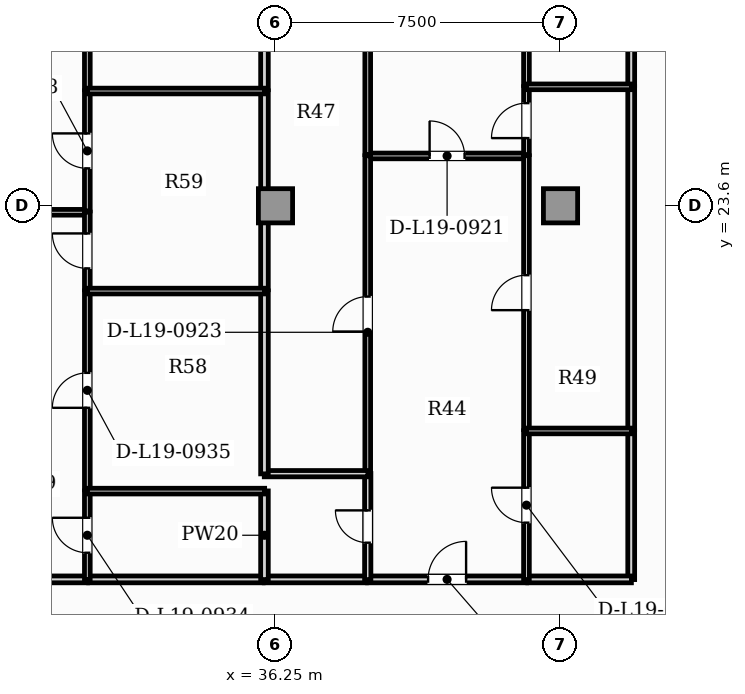
"""IFC4 building model, lengths in metres.
Left out: names, types, materials, properties, quantities, classifications, styles, units other than length and angle.
Written with IfcOpenShell. Run it as: python <this file> out.ifc"""

import sys

from ifc_helpers import new_model, si_unit, direction, frame, frame_2d, origin, origin_2d, place, context, subcontext, project, spatial, rectangle, extrude, element, fill, save


model = new_model("IFC4")
c1 = context("Model", 3, precision=1e-05, world=origin(), true_north=direction((0.0, 1.0)))
c2 = subcontext(c1, "Body", "Model", "MODEL_VIEW")
j1 = project(units=[si_unit("LENGTHUNIT", "METRE"), si_unit("PLANEANGLEUNIT", "RADIAN")], contexts=[c1])
p1 = place(None, origin())
s1 = spatial("IfcSite", under=j1, at=p1, CompositionType="ELEMENT")
p2 = place(p1, origin())
s2 = spatial("IfcBuilding", under=s1, at=p2, CompositionType="ELEMENT")
p3 = place(p2, frame((0.0, 0.0, 81.05)))
s3 = spatial("IfcBuildingStorey", under=s2, at=p3, CompositionType="ELEMENT", Elevation=81.05)
for number, where, z_axis, x_axis in (
    (1, (36.25, 23.6, 0.0), (0.0, 0.0, 1.0), (1.0, 0.0, 0.0)),
    (2, (43.75, 23.6, 0.0), (0.0, 0.0, 1.0), (1.0, 0.0, 0.0)),
):
    element("IfcColumn", number, at=place(p3, frame(where, z_axis=z_axis, x_axis=x_axis)), inside=s3, PredefinedType="COLUMN", context=c2, shape_type="SweptSolid", body=[
        extrude(rectangle(XDim=0.9, YDim=0.9, at=origin_2d()), origin(), (0.0, 0.0, 1.0), 3.85),
    ])
p4 = place(p3, frame((38.672, 13.77, 0.0), z_axis=(0.0, 0.0, 1.0), x_axis=(1.0, 0.0, 0.0)))
e3 = element("IfcWall", 3, at=p4, inside=s3, PredefinedType="PARTITIONING", context=c2, shape_type="SweptSolid", body=[
    extrude(rectangle(XDim=4.186, YDim=0.18, at=frame_2d((2.093, 0.0))), origin(), (0.0, 0.0, 1.0), 3.6),
])
p5 = place(p4, frame((1.593, 0.0, 0.0)))
e4 = element("IfcOpeningElement", 4, at=p5, cuts=e3, PredefinedType="OPENING", context=c2, shape_type="SweptSolid", body=[
    extrude(rectangle(XDim=1.0, YDim=2.15, at=frame_2d((0.5, 1.075))), frame((0.0, 0.1, 0.0), z_axis=(0.0, -1.0, 0.0), x_axis=(1.0, 0.0, 0.0)), (0.0, 0.0, 1.0), 0.2),
])
p6 = place(p3, frame((35.955, 13.77, 0.0), z_axis=(0.0, 0.0, 1.0), x_axis=(1.0, 0.0, 0.0)))
e5 = element("IfcWall", 5, at=p6, inside=s3, PredefinedType="PARTITIONING", context=c2, shape_type="SweptSolid", body=[
    extrude(rectangle(XDim=2.687, YDim=0.18, at=frame_2d((1.344, 0.0))), origin(), (0.0, 0.0, 1.0), 3.6),
])
p7 = place(p3, frame((45.61, 13.765, 0.0), z_axis=(0.0, 0.0, 1.0), x_axis=(0.0, 1.0, 0.0)))
e6 = element("IfcWall", 6, at=p7, inside=s3, PredefinedType="PARTITIONING", context=c2, shape_type="SweptSolid", body=[
    extrude(rectangle(XDim=3.916, YDim=0.18, at=frame_2d((1.958, 0.0))), origin(), (0.0, 0.0, 1.0), 3.6),
])
p8 = place(p3, frame((42.888, 13.77, 0.0), z_axis=(0.0, 0.0, 1.0), x_axis=(1.0, 0.0, 0.0)))
e7 = element("IfcWall", 7, at=p8, inside=s3, PredefinedType="PARTITIONING", context=c2, shape_type="SweptSolid", body=[
    extrude(rectangle(XDim=2.727, YDim=0.18, at=frame_2d((1.363, 0.0))), origin(), (0.0, 0.0, 1.0), 3.6),
])
p9 = place(p3, frame((45.61, 17.711, 0.0), z_axis=(0.0, 0.0, 1.0), x_axis=(0.0, 1.0, 0.0)))
e8 = element("IfcWall", 8, at=p9, inside=s3, PredefinedType="PARTITIONING", context=c2, shape_type="SweptSolid", body=[
    extrude(rectangle(XDim=9.024, YDim=0.18, at=frame_2d((4.512, 0.0))), origin(), (0.0, 0.0, 1.0), 3.6),
])
p10 = place(p3, frame((45.61, 26.765, 0.0), z_axis=(0.0, 0.0, 1.0), x_axis=(0.0, 1.0, 0.0)))
e9 = element("IfcWall", 9, at=p10, inside=s3, PredefinedType="PARTITIONING", context=c2, shape_type="SweptSolid", body=[
    extrude(rectangle(XDim=1.13, YDim=0.18, at=frame_2d((0.565, 0.0))), origin(), (0.0, 0.0, 1.0), 3.6),
])
p11 = place(p3, frame((26.314, 13.77, 0.0), z_axis=(0.0, 0.0, 1.0), x_axis=(1.0, 0.0, 0.0)))
e10 = element("IfcWall", 10, at=p11, inside=s3, PredefinedType="PARTITIONING", context=c2, shape_type="SweptSolid", body=[
    extrude(rectangle(XDim=4.99, YDim=0.18, at=frame_2d((2.495, 0.0))), origin(), (0.0, 0.0, 1.0), 3.6),
])
p12 = place(p11, frame((1.995, 0.0, 0.0)))
e11 = element("IfcOpeningElement", 11, at=p12, cuts=e10, PredefinedType="OPENING", context=c2, shape_type="SweptSolid", body=[
    extrude(rectangle(XDim=1.0, YDim=2.15, at=frame_2d((0.5, 1.075))), frame((0.0, 0.1, 0.0), z_axis=(0.0, -1.0, 0.0), x_axis=(1.0, 0.0, 0.0)), (0.0, 0.0, 1.0), 0.2),
])
p13 = place(p3, frame((31.334, 13.77, 0.0), z_axis=(0.0, 0.0, 1.0), x_axis=(1.0, 0.0, 0.0)))
e12 = element("IfcWall", 12, at=p13, inside=s3, PredefinedType="PARTITIONING", context=c2, shape_type="SweptSolid", body=[
    extrude(rectangle(XDim=4.591, YDim=0.18, at=frame_2d((2.295, 0.0))), origin(), (0.0, 0.0, 1.0), 3.6),
])
p14 = place(p3, frame((38.672, 24.912, 0.0), z_axis=(0.0, 0.0, 1.0), x_axis=(1.0, 0.0, 0.0)))
e13 = element("IfcWall", 13, at=p14, inside=s3, PredefinedType="PARTITIONING", context=c2, shape_type="SweptSolid", body=[
    extrude(rectangle(XDim=4.186, YDim=0.15, at=frame_2d((2.093, 0.0))), origin(), (0.0, 0.0, 1.0), 3.6),
])
p15 = place(p14, frame((1.633, 0.0, 0.0)))
e14 = element("IfcOpeningElement", 14, at=p15, cuts=e13, PredefinedType="OPENING", context=c2, shape_type="SweptSolid", body=[
    extrude(rectangle(XDim=0.92, YDim=2.1, at=frame_2d((0.46, 1.05))), frame((0.0, 0.085, 0.0), z_axis=(0.0, -1.0, 0.0), x_axis=(1.0, 0.0, 0.0)), (0.0, 0.0, 1.0), 0.17),
])
p16 = place(p3, frame((38.677, 13.765, 0.0), z_axis=(0.0, 0.0, 1.0), x_axis=(0.0, 1.0, 0.0)))
e15 = element("IfcWall", 15, at=p16, inside=s3, PredefinedType="PLUMBINGWALL", context=c2, shape_type="SweptSolid", body=[
    extrude(rectangle(XDim=2.792, YDim=0.165, at=frame_2d((1.396, 0.0))), origin(), (0.0, 0.0, 1.0), 3.6),
])
p17 = place(p16, frame((0.971, 0.0, 0.0)))
e16 = element("IfcOpeningElement", 16, at=p17, cuts=e15, PredefinedType="OPENING", context=c2, shape_type="SweptSolid", body=[
    extrude(rectangle(XDim=0.85, YDim=2.1, at=frame_2d((0.425, 1.05))), frame((0.0, 0.093, 0.0), z_axis=(0.0, -1.0, 0.0), x_axis=(1.0, 0.0, 0.0)), (0.0, 0.0, 1.0), 0.185),
])
p18 = place(p3, frame((38.677, 16.586, 0.0), z_axis=(0.0, 0.0, 1.0), x_axis=(0.0, 1.0, 0.0)))
e17 = element("IfcWall", 17, at=p18, inside=s3, PredefinedType="PARTITIONING", context=c2, shape_type="SweptSolid", body=[
    extrude(rectangle(XDim=8.331, YDim=0.15, at=frame_2d((4.166, 0.0))), origin(), (0.0, 0.0, 1.0), 3.6),
])
p19 = place(p18, frame((3.705, 0.0, 0.0)))
e18 = element("IfcOpeningElement", 18, at=p19, cuts=e17, PredefinedType="OPENING", context=c2, shape_type="SweptSolid", body=[
    extrude(rectangle(XDim=0.92, YDim=2.1, at=frame_2d((0.46, 1.05))), frame((0.0, 0.085, 0.0), z_axis=(0.0, -1.0, 0.0), x_axis=(1.0, 0.0, 0.0)), (0.0, 0.0, 1.0), 0.17),
])
p20 = place(p3, frame((42.854, 13.765, 0.0), z_axis=(0.0, 0.0, 1.0), x_axis=(0.0, 1.0, 0.0)))
e19 = element("IfcWall", 19, at=p20, inside=s3, PredefinedType="PARTITIONING", context=c2, shape_type="SweptSolid", body=[
    extrude(rectangle(XDim=3.916, YDim=0.15, at=frame_2d((1.958, 0.0))), origin(), (0.0, 0.0, 1.0), 3.6),
])
p21 = place(p20, frame((1.498, 0.0, 0.0)))
e20 = element("IfcOpeningElement", 20, at=p21, cuts=e19, PredefinedType="OPENING", context=c2, shape_type="SweptSolid", body=[
    extrude(rectangle(XDim=0.92, YDim=2.1, at=frame_2d((0.46, 1.05))), frame((0.0, 0.085, 0.0), z_axis=(0.0, -1.0, 0.0), x_axis=(1.0, 0.0, 0.0)), (0.0, 0.0, 1.0), 0.17),
])
p22 = place(p3, frame((42.854, 17.711, 0.0), z_axis=(0.0, 0.0, 1.0), x_axis=(0.0, 1.0, 0.0)))
e21 = element("IfcWall", 21, at=p22, inside=s3, PredefinedType="PARTITIONING", context=c2, shape_type="SweptSolid", body=[
    extrude(rectangle(XDim=7.206, YDim=0.15, at=frame_2d((3.603, 0.0))), origin(), (0.0, 0.0, 1.0), 3.6),
])
p23 = place(p22, frame((3.143, 0.0, 0.0)))
e22 = element("IfcOpeningElement", 22, at=p23, cuts=e21, PredefinedType="OPENING", context=c2, shape_type="SweptSolid", body=[
    extrude(rectangle(XDim=0.92, YDim=2.1, at=frame_2d((0.46, 1.05))), frame((0.0, 0.085, 0.0), z_axis=(0.0, -1.0, 0.0), x_axis=(1.0, 0.0, 0.0)), (0.0, 0.0, 1.0), 0.17),
])
p24 = place(p3, frame((38.677, 24.947, 0.0), z_axis=(0.0, 0.0, 1.0), x_axis=(0.0, 1.0, 0.0)))
e23 = element("IfcWall", 23, at=p24, inside=s3, PredefinedType="PARTITIONING", context=c2, shape_type="SweptSolid", body=[
    extrude(rectangle(XDim=13.678, YDim=0.15, at=frame_2d((6.839, 0.0))), origin(), (0.0, 0.0, 1.0), 3.6),
])
p25 = place(p24, frame((6.379, 0.0, 0.0)))
e24 = element("IfcOpeningElement", 24, at=p25, cuts=e23, PredefinedType="OPENING", context=c2, shape_type="SweptSolid", body=[
    extrude(rectangle(XDim=0.92, YDim=2.1, at=frame_2d((0.46, 1.05))), frame((0.0, 0.085, 0.0), z_axis=(0.0, -1.0, 0.0), x_axis=(1.0, 0.0, 0.0)), (0.0, 0.0, 1.0), 0.17),
])
p26 = place(p3, frame((42.854, 24.947, 0.0), z_axis=(0.0, 0.0, 1.0), x_axis=(0.0, 1.0, 0.0)))
e25 = element("IfcWall", 25, at=p26, inside=s3, PredefinedType="PARTITIONING", context=c2, shape_type="SweptSolid", body=[
    extrude(rectangle(XDim=1.788, YDim=0.15, at=frame_2d((0.894, 0.0))), origin(), (0.0, 0.0, 1.0), 3.6),
])
p27 = place(p26, frame((0.434, 0.0, 0.0)))
e26 = element("IfcOpeningElement", 26, at=p27, cuts=e25, PredefinedType="OPENING", context=c2, shape_type="SweptSolid", body=[
    extrude(rectangle(XDim=0.92, YDim=2.1, at=frame_2d((0.46, 1.05))), frame((0.0, 0.085, 0.0), z_axis=(0.0, -1.0, 0.0), x_axis=(1.0, 0.0, 0.0)), (0.0, 0.0, 1.0), 0.17),
])
p28 = place(p3, frame((42.854, 26.765, 0.0), z_axis=(0.0, 0.0, 1.0), x_axis=(0.0, 1.0, 0.0)))
e27 = element("IfcWall", 27, at=p28, inside=s3, PredefinedType="PARTITIONING", context=c2, shape_type="SweptSolid", body=[
    extrude(rectangle(XDim=11.86, YDim=0.15, at=frame_2d((5.93, 0.0))), origin(), (0.0, 0.0, 1.0), 3.6),
])
p29 = place(p28, frame((5.47, 0.0, 0.0)))
e28 = element("IfcOpeningElement", 28, at=p29, cuts=e27, PredefinedType="OPENING", context=c2, shape_type="SweptSolid", body=[
    extrude(rectangle(XDim=0.92, YDim=2.1, at=frame_2d((0.46, 1.05))), frame((0.0, 0.085, 0.0), z_axis=(0.0, -1.0, 0.0), x_axis=(1.0, 0.0, 0.0)), (0.0, 0.0, 1.0), 0.17),
])
p30 = place(p3, frame((35.955, 16.551, 0.0), z_axis=(0.0, 0.0, 1.0), x_axis=(1.0, 0.0, 0.0)))
e29 = element("IfcWall", 29, at=p30, inside=s3, PredefinedType="PLUMBINGWALL", context=c2, shape_type="SweptSolid", body=[
    extrude(rectangle(XDim=2.727, YDim=0.165, at=frame_2d((1.364, 0.0))), origin(), (0.0, 0.0, 1.0), 3.6),
])
p31 = place(p3, frame((35.96, 13.765, 0.0), z_axis=(0.0, 0.0, 1.0), x_axis=(0.0, 1.0, 0.0)))
e30 = element("IfcWall", 30, at=p31, inside=s3, PredefinedType="PARTITIONING", context=c2, shape_type="SweptSolid", body=[
    extrude(rectangle(XDim=2.333, YDim=0.2, at=frame_2d((1.166, 0.0))), origin(), (0.0, 0.0, 1.0), 3.6),
])
p32 = place(p3, frame((35.96, 16.546, 0.0), z_axis=(0.0, 0.0, 1.0), x_axis=(0.0, 1.0, 0.0)))
e31 = element("IfcWall", 31, at=p32, inside=s3, PredefinedType="PARTITIONING", context=c2, shape_type="SweptSolid", body=[
    extrude(rectangle(XDim=4.815, YDim=0.2, at=frame_2d((2.407, 0.0))), origin(), (0.0, 0.0, 1.0), 3.6),
])
p33 = place(p3, frame((35.96, 21.391, 0.0), z_axis=(0.0, 0.0, 1.0), x_axis=(0.0, 1.0, 0.0)))
e32 = element("IfcWall", 32, at=p33, inside=s3, PredefinedType="PARTITIONING", context=c2, shape_type="SweptSolid", body=[
    extrude(rectangle(XDim=5.234, YDim=0.2, at=frame_2d((2.617, 0.0))), origin(), (0.0, 0.0, 1.0), 3.6),
])
p34 = place(p3, frame((35.96, 26.655, 0.0), z_axis=(0.0, 0.0, 1.0), x_axis=(0.0, 1.0, 0.0)))
e33 = element("IfcWall", 33, at=p34, inside=s3, PredefinedType="PARTITIONING", context=c2, shape_type="SweptSolid", body=[
    extrude(rectangle(XDim=6.81, YDim=0.2, at=frame_2d((3.405, 0.0))), origin(), (0.0, 0.0, 1.0), 3.6),
])
for number, where, z_axis, x_axis in (
    (34, (42.848, 17.676, 0.0), (0.0, 0.0, 1.0), (1.0, 0.0, 0.0)),
    (35, (42.848, 26.73, 0.0), (0.0, 0.0, 1.0), (1.0, 0.0, 0.0)),
):
    element("IfcWall", number, at=place(p3, frame(where, z_axis=z_axis, x_axis=x_axis)), inside=s3, PredefinedType="PARTITIONING", context=c2, shape_type="SweptSolid", body=[
        extrude(rectangle(XDim=2.767, YDim=0.15, at=frame_2d((1.383, 0.0))), origin(), (0.0, 0.0, 1.0), 3.6),
    ])
p35 = place(p3, frame((26.314, 23.429, 0.0), z_axis=(0.0, 0.0, 1.0), x_axis=(1.0, 0.0, 0.0)))
e36 = element("IfcWall", 36, at=p35, inside=s3, PredefinedType="PARTITIONING", context=c2, shape_type="SweptSolid", body=[
    extrude(rectangle(XDim=4.99, YDim=0.15, at=frame_2d((2.495, 0.0))), origin(), (0.0, 0.0, 1.0), 2.964),
])
p36 = place(p35, frame((0.538, 0.0, 0.0)))
e37 = element("IfcOpeningElement", 37, at=p36, cuts=e36, PredefinedType="OPENING", context=c2, shape_type="SweptSolid", body=[
    extrude(rectangle(XDim=0.92, YDim=2.1, at=frame_2d((0.46, 1.05))), frame((0.0, 0.085, 0.0), z_axis=(0.0, -1.0, 0.0), x_axis=(1.0, 0.0, 0.0)), (0.0, 0.0, 1.0), 0.17),
])
p37 = place(p3, frame((31.299, 13.765, 0.0), z_axis=(0.0, 0.0, 1.0), x_axis=(0.0, 1.0, 0.0)))
e38 = element("IfcWall", 38, at=p37, inside=s3, PredefinedType="PARTITIONING", context=c2, shape_type="SweptSolid", body=[
    extrude(rectangle(XDim=2.333, YDim=0.15, at=frame_2d((1.166, 0.0))), origin(), (0.0, 0.0, 1.0), 3.6),
])
p38 = place(p37, frame((0.706, 0.0, 0.0)))
e39 = element("IfcOpeningElement", 39, at=p38, cuts=e38, PredefinedType="OPENING", context=c2, shape_type="SweptSolid", body=[
    extrude(rectangle(XDim=0.92, YDim=2.1, at=frame_2d((0.46, 1.05))), frame((0.0, 0.085, 0.0), z_axis=(0.0, -1.0, 0.0), x_axis=(1.0, 0.0, 0.0)), (0.0, 0.0, 1.0), 0.17),
])
p39 = place(p3, frame((31.299, 16.127, 0.0), z_axis=(0.0, 0.0, 1.0), x_axis=(0.0, 1.0, 0.0)))
e40 = element("IfcWall", 40, at=p39, inside=s3, PredefinedType="PARTITIONING", context=c2, shape_type="SweptSolid", body=[
    extrude(rectangle(XDim=5.234, YDim=0.15, at=frame_2d((2.617, 0.0))), origin(), (0.0, 0.0, 1.0), 3.6),
])
p40 = place(p39, frame((2.157, 0.0, 0.0)))
e41 = element("IfcOpeningElement", 41, at=p40, cuts=e40, PredefinedType="OPENING", context=c2, shape_type="SweptSolid", body=[
    extrude(rectangle(XDim=0.92, YDim=2.1, at=frame_2d((0.46, 1.05))), frame((0.0, 0.085, 0.0), z_axis=(0.0, -1.0, 0.0), x_axis=(1.0, 0.0, 0.0)), (0.0, 0.0, 1.0), 0.17),
])
p41 = place(p3, frame((31.299, 21.391, 0.0), z_axis=(0.0, 0.0, 1.0), x_axis=(0.0, 1.0, 0.0)))
e42 = element("IfcWall", 42, at=p41, inside=s3, PredefinedType="PARTITIONING", context=c2, shape_type="SweptSolid", body=[
    extrude(rectangle(XDim=2.043, YDim=0.15, at=frame_2d((1.021, 0.0))), origin(), (0.0, 0.0, 1.0), 3.6),
])
p42 = place(p41, frame((0.562, 0.0, 0.0)))
e43 = element("IfcOpeningElement", 43, at=p42, cuts=e42, PredefinedType="OPENING", context=c2, shape_type="SweptSolid", body=[
    extrude(rectangle(XDim=0.92, YDim=2.1, at=frame_2d((0.46, 1.05))), frame((0.0, 0.085, 0.0), z_axis=(0.0, -1.0, 0.0), x_axis=(1.0, 0.0, 0.0)), (0.0, 0.0, 1.0), 0.17),
])
p43 = place(p3, frame((31.299, 23.464, 0.0), z_axis=(0.0, 0.0, 1.0), x_axis=(0.0, 1.0, 0.0)))
e44 = element("IfcWall", 44, at=p43, inside=s3, PredefinedType="PARTITIONING", context=c2, shape_type="SweptSolid", body=[
    extrude(rectangle(XDim=3.161, YDim=0.15, at=frame_2d((1.58, 0.0))), origin(), (0.0, 0.0, 1.0), 3.6),
])
p44 = place(p43, frame((1.12, 0.0, 0.0)))
e45 = element("IfcOpeningElement", 45, at=p44, cuts=e44, PredefinedType="OPENING", context=c2, shape_type="SweptSolid", body=[
    extrude(rectangle(XDim=0.92, YDim=2.1, at=frame_2d((0.46, 1.05))), frame((0.0, 0.085, 0.0), z_axis=(0.0, -1.0, 0.0), x_axis=(1.0, 0.0, 0.0)), (0.0, 0.0, 1.0), 0.17),
])
p45 = place(p3, frame((31.299, 26.655, 0.0), z_axis=(0.0, 0.0, 1.0), x_axis=(0.0, 1.0, 0.0)))
e46 = element("IfcWall", 46, at=p45, inside=s3, PredefinedType="PARTITIONING", context=c2, shape_type="SweptSolid", body=[
    extrude(rectangle(XDim=6.85, YDim=0.15, at=frame_2d((3.425, 0.0))), origin(), (0.0, 0.0, 1.0), 3.6),
])
p46 = place(p45, frame((2.965, 0.0, 0.0)))
e47 = element("IfcOpeningElement", 47, at=p46, cuts=e46, PredefinedType="OPENING", context=c2, shape_type="SweptSolid", body=[
    extrude(rectangle(XDim=0.92, YDim=2.1, at=frame_2d((0.46, 1.05))), frame((0.0, 0.085, 0.0), z_axis=(0.0, -1.0, 0.0), x_axis=(1.0, 0.0, 0.0)), (0.0, 0.0, 1.0), 0.17),
])
for number, where, z_axis, x_axis in (
    (48, (31.294, 16.093, 0.0), (0.0, 0.0, 1.0), (1.0, 0.0, 0.0)),
    (49, (31.294, 21.356, 0.0), (0.0, 0.0, 1.0), (1.0, 0.0, 0.0)),
    (50, (31.294, 26.62, 0.0), (0.0, 0.0, 1.0), (1.0, 0.0, 0.0)),
):
    element("IfcWall", number, at=place(p3, frame(where, z_axis=z_axis, x_axis=x_axis)), inside=s3, PredefinedType="PARTITIONING", context=c2, shape_type="SweptSolid", body=[
        extrude(rectangle(XDim=4.671, YDim=0.15, at=frame_2d((2.335, 0.0))), origin(), (0.0, 0.0, 1.0), 3.6),
    ])
p47 = place(p5, origin())
e51 = element("IfcDoor", 51, at=p47, inside=s3, OperationType="SINGLE_SWING_RIGHT", PredefinedType="DOOR", context=c2, shape_type="SweptSolid", body=[
    extrude(rectangle(XDim=1.0, YDim=2.15, at=frame_2d((0.5, 1.075))), frame((0.0, 0.025, 0.0), z_axis=(0.0, -1.0, 0.0), x_axis=(1.0, 0.0, 0.0)), (0.0, 0.0, 1.0), 0.05),
])
fill(e4, e51)
p48 = place(p15, origin())
e52 = element("IfcDoor", 52, at=p48, inside=s3, OperationType="SINGLE_SWING_LEFT", PredefinedType="DOOR", context=c2, shape_type="SweptSolid", body=[
    extrude(rectangle(XDim=0.92, YDim=2.1, at=frame_2d((0.46, 1.05))), frame((0.0, 0.025, 0.0), z_axis=(0.0, -1.0, 0.0), x_axis=(1.0, 0.0, 0.0)), (0.0, 0.0, 1.0), 0.05),
])
fill(e14, e52)
p49 = place(p17, origin())
e53 = element("IfcDoor", 53, at=p49, inside=s3, OperationType="SINGLE_SWING_RIGHT", PredefinedType="DOOR", context=c2, shape_type="SweptSolid", body=[
    extrude(rectangle(XDim=0.85, YDim=2.1, at=frame_2d((0.425, 1.05))), frame((0.0, 0.025, 0.0), z_axis=(0.0, -1.0, 0.0), x_axis=(1.0, 0.0, 0.0)), (0.0, 0.0, 1.0), 0.05),
])
fill(e16, e53)
p50 = place(p19, origin())
e54 = element("IfcDoor", 54, at=p50, inside=s3, OperationType="SINGLE_SWING_LEFT", PredefinedType="DOOR", context=c2, shape_type="SweptSolid", body=[
    extrude(rectangle(XDim=0.92, YDim=2.1, at=frame_2d((0.46, 1.05))), frame((0.0, 0.025, 0.0), z_axis=(0.0, -1.0, 0.0), x_axis=(1.0, 0.0, 0.0)), (0.0, 0.0, 1.0), 0.05),
])
fill(e18, e54)
p51 = place(p21, origin())
e55 = element("IfcDoor", 55, at=p51, inside=s3, OperationType="SINGLE_SWING_RIGHT", PredefinedType="DOOR", context=c2, shape_type="SweptSolid", body=[
    extrude(rectangle(XDim=0.92, YDim=2.1, at=frame_2d((0.46, 1.05))), frame((0.0, 0.025, 0.0), z_axis=(0.0, -1.0, 0.0), x_axis=(1.0, 0.0, 0.0)), (0.0, 0.0, 1.0), 0.05),
])
fill(e20, e55)
p52 = place(p23, origin())
e56 = element("IfcDoor", 56, at=p52, inside=s3, OperationType="SINGLE_SWING_LEFT", PredefinedType="DOOR", context=c2, shape_type="SweptSolid", body=[
    extrude(rectangle(XDim=0.92, YDim=2.1, at=frame_2d((0.46, 1.05))), frame((0.0, 0.025, 0.0), z_axis=(0.0, -1.0, 0.0), x_axis=(1.0, 0.0, 0.0)), (0.0, 0.0, 1.0), 0.05),
])
fill(e22, e56)
p53 = place(p27, origin())
e57 = element("IfcDoor", 57, at=p53, inside=s3, OperationType="SINGLE_SWING_LEFT", PredefinedType="DOOR", context=c2, shape_type="SweptSolid", body=[
    extrude(rectangle(XDim=0.92, YDim=2.1, at=frame_2d((0.46, 1.05))), frame((0.0, 0.025, 0.0), z_axis=(0.0, -1.0, 0.0), x_axis=(1.0, 0.0, 0.0)), (0.0, 0.0, 1.0), 0.05),
])
fill(e26, e57)
p54 = place(p38, origin())
e58 = element("IfcDoor", 58, at=p54, inside=s3, OperationType="SINGLE_SWING_RIGHT", PredefinedType="DOOR", context=c2, shape_type="SweptSolid", body=[
    extrude(rectangle(XDim=0.92, YDim=2.1, at=frame_2d((0.46, 1.05))), frame((0.0, 0.025, 0.0), z_axis=(0.0, -1.0, 0.0), x_axis=(1.0, 0.0, 0.0)), (0.0, 0.0, 1.0), 0.05),
])
fill(e39, e58)
p55 = place(p40, origin())
e59 = element("IfcDoor", 59, at=p55, inside=s3, OperationType="SINGLE_SWING_LEFT", PredefinedType="DOOR", context=c2, shape_type="SweptSolid", body=[
    extrude(rectangle(XDim=0.92, YDim=2.1, at=frame_2d((0.46, 1.05))), frame((0.0, 0.025, 0.0), z_axis=(0.0, -1.0, 0.0), x_axis=(1.0, 0.0, 0.0)), (0.0, 0.0, 1.0), 0.05),
])
fill(e41, e59)
p56 = place(p42, origin())
e60 = element("IfcDoor", 60, at=p56, inside=s3, OperationType="SINGLE_SWING_RIGHT", PredefinedType="DOOR", context=c2, shape_type="SweptSolid", body=[
    extrude(rectangle(XDim=0.92, YDim=2.1, at=frame_2d((0.46, 1.05))), frame((0.0, 0.025, 0.0), z_axis=(0.0, -1.0, 0.0), x_axis=(1.0, 0.0, 0.0)), (0.0, 0.0, 1.0), 0.05),
])
fill(e43, e60)
p57 = place(p44, origin())
e61 = element("IfcDoor", 61, at=p57, inside=s3, OperationType="SINGLE_SWING_RIGHT", PredefinedType="DOOR", context=c2, shape_type="SweptSolid", body=[
    extrude(rectangle(XDim=0.92, YDim=2.1, at=frame_2d((0.46, 1.05))), frame((0.0, 0.025, 0.0), z_axis=(0.0, -1.0, 0.0), x_axis=(1.0, 0.0, 0.0)), (0.0, 0.0, 1.0), 0.05),
])
fill(e45, e61)
save(model, sys.argv[1])
